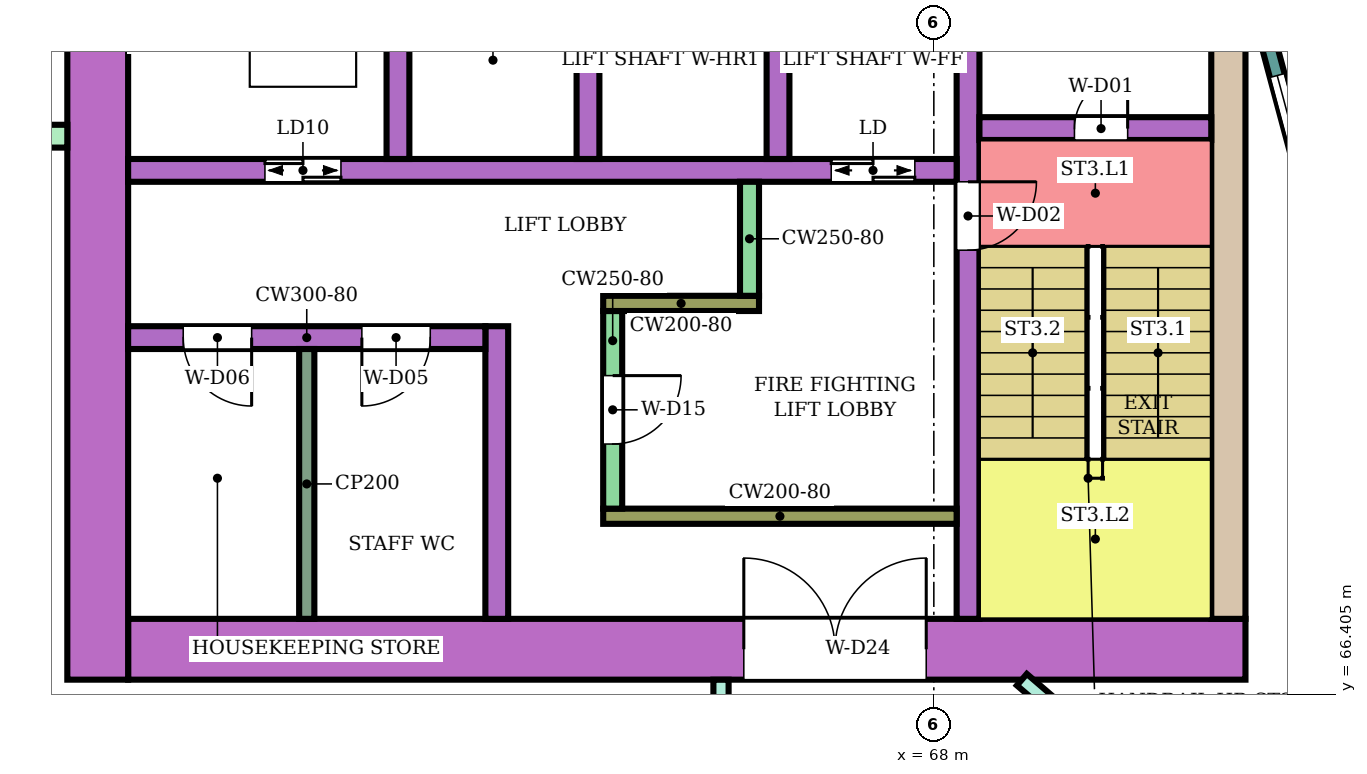
"""IFC4 building model, lengths in metres.
Left out: names, types, materials, properties, quantities, classifications, styles, units other than length and angle.
Written with IfcOpenShell. Run it as: python <this file> out.ifc"""

import sys

from ifc_helpers import new_model, si_unit, direction, frame, frame_2d, origin, place, context, subcontext, project, spatial, rectangle, extrude, element, fill, save


model = new_model("IFC4")
c1 = context("Model", 3, precision=1e-05, world=origin(), true_north=direction((0.0, 1.0)))
c2 = subcontext(c1, "Body", "Model", "MODEL_VIEW")
j1 = project(units=[si_unit("LENGTHUNIT", "METRE"), si_unit("PLANEANGLEUNIT", "RADIAN")], contexts=[c1])
p1 = place(None, origin())
s1 = spatial("IfcSite", under=j1, at=p1, CompositionType="ELEMENT")
p2 = place(p1, origin())
s2 = spatial("IfcBuilding", under=s1, at=p2, CompositionType="ELEMENT")
p3 = place(p2, frame((0.0, 0.0, 44.0)))
s3 = spatial("IfcBuildingStorey", under=s2, at=p3, CompositionType="ELEMENT", Elevation=44.0)
p4 = place(p3, frame((72.1, 67.0, 0.0), z_axis=(0.0, 0.0, 1.0), x_axis=(-1.0, 0.0, 0.0)))
e1 = element("IfcWall", 1, at=p4, inside=s3, PredefinedType="SHEAR", context=c2, shape_type="SweptSolid", body=[
    extrude(rectangle(XDim=14.7, YDim=0.8, at=frame_2d((7.35, 0.0))), origin(), (0.0, 0.0, 1.0), 3.48),
])
p5 = place(p4, frame((4.2, 0.0, 0.0)))
e2 = element("IfcOpeningElement", 2, at=p5, cuts=e1, PredefinedType="OPENING", context=c2, shape_type="SweptSolid", body=[
    extrude(rectangle(XDim=2.4, YDim=2.4, at=frame_2d((1.2, 1.2))), frame((0.0, 0.41, 0.0), z_axis=(0.0, -1.0, 0.0), x_axis=(1.0, 0.0, 0.0)), (0.0, 0.0, 1.0), 0.82),
])
p6 = place(p3, frame((71.875, 75.0, 0.0), z_axis=(0.0, 0.0, 1.0), x_axis=(0.0, -1.0, 0.0)))
e3 = element("IfcWall", 3, at=p6, inside=s3, PredefinedType="SHEAR", context=c2, shape_type="SweptSolid", body=[
    extrude(rectangle(XDim=7.6, YDim=0.45, at=frame_2d((3.8, 0.0))), origin(), (0.0, 0.0, 1.0), 3.48),
])
p7 = place(p3, frame((57.0, 83.4, 0.0), z_axis=(0.0, 0.0, 1.0), x_axis=(0.0, -1.0, 0.0)))
e4 = element("IfcWall", 4, at=p7, inside=s3, PredefinedType="SHEAR", context=c2, shape_type="SweptSolid", body=[
    extrude(rectangle(XDim=16.8, YDim=0.8, at=frame_2d((8.4, 0.0))), origin(), (0.0, 0.0, 1.0), 3.48),
])
p8 = place(p3, frame((68.45, 75.0, 0.0), z_axis=(0.0, 0.0, 1.0), x_axis=(0.0, -1.0, 0.0)))
e5 = element("IfcWall", 5, at=p8, inside=s3, PredefinedType="SHEAR", context=c2, shape_type="SweptSolid", body=[
    extrude(rectangle(XDim=7.6, YDim=0.3, at=frame_2d((3.8, 0.0))), origin(), (0.0, 0.0, 1.0), 3.48),
])
p9 = place(p8, frame((1.85, 0.0, 0.0)))
e6 = element("IfcOpeningElement", 6, at=p9, cuts=e5, PredefinedType="OPENING", context=c2, shape_type="SweptSolid", body=[
    extrude(rectangle(XDim=0.9, YDim=2.1, at=frame_2d((0.45, 1.05))), frame((0.0, 0.16, 0.0), z_axis=(0.0, -1.0, 0.0), x_axis=(1.0, 0.0, 0.0)), (0.0, 0.0, 1.0), 0.32),
])
p10 = place(p3, frame((71.65, 73.85, 0.0), z_axis=(0.0, 0.0, 1.0), x_axis=(-1.0, 0.0, 0.0)))
e7 = element("IfcWall", 7, at=p10, inside=s3, PredefinedType="SHEAR", context=c2, shape_type="SweptSolid", body=[
    extrude(rectangle(XDim=3.05, YDim=0.3, at=frame_2d((1.525, 0.0))), origin(), (0.0, 0.0, 1.0), 3.48),
])
p11 = place(p10, frame((1.1, 0.0, 0.0)))
e8 = element("IfcOpeningElement", 8, at=p11, cuts=e7, PredefinedType="OPENING", context=c2, shape_type="SweptSolid", body=[
    extrude(rectangle(XDim=0.7, YDim=2.0, at=frame_2d((0.35, 1.0))), frame((0.0, 0.16, 0.0), z_axis=(0.0, -1.0, 0.0), x_axis=(1.0, 0.0, 0.0)), (0.0, 0.0, 1.0), 0.32),
])
p12 = place(p3, frame((68.3, 73.3, 0.0), z_axis=(0.0, 0.0, 1.0), x_axis=(-1.0, 0.0, 0.0)))
e9 = element("IfcWall", 9, at=p12, inside=s3, PredefinedType="SHEAR", context=c2, shape_type="SweptSolid", body=[
    extrude(rectangle(XDim=10.9, YDim=0.3, at=frame_2d((5.45, 0.0))), origin(), (0.0, 0.0, 1.0), 3.48),
])
p13 = place(p12, frame((0.55, 0.0, 0.0)))
e10 = element("IfcOpeningElement", 10, at=p13, cuts=e9, PredefinedType="OPENING", context=c2, shape_type="SweptSolid", body=[
    extrude(rectangle(XDim=1.1, YDim=2.1, at=frame_2d((0.55, 1.05))), frame((0.0, 0.16, 0.0), z_axis=(0.0, -1.0, 0.0), x_axis=(1.0, 0.0, 0.0)), (0.0, 0.0, 1.0), 0.32),
])
p14 = place(p12, frame((8.1, 0.0, 0.0)))
e11 = element("IfcOpeningElement", 11, at=p14, cuts=e9, PredefinedType="OPENING", context=c2, shape_type="SweptSolid", body=[
    extrude(rectangle(XDim=1.0, YDim=2.1, at=frame_2d((0.5, 1.05))), frame((0.0, 0.16, 0.0), z_axis=(0.0, -1.0, 0.0), x_axis=(1.0, 0.0, 0.0)), (0.0, 0.0, 1.0), 0.32),
])
for number, where, z_axis, x_axis in (
    (12, (65.95, 76.0, 0.0), (0.0, 0.0, 1.0), (0.0, -1.0, 0.0)),
    (13, (63.45, 76.0, 0.0), (0.0, 0.0, 1.0), (0.0, -1.0, 0.0)),
    (14, (60.95, 76.0, 0.0), (0.0, 0.0, 1.0), (0.0, -1.0, 0.0)),
):
    element("IfcWall", number, at=place(p3, frame(where, z_axis=z_axis, x_axis=x_axis)), inside=s3, PredefinedType="SHEAR", context=c2, shape_type="SweptSolid", body=[
        extrude(rectangle(XDim=2.55, YDim=0.3, at=frame_2d((1.275, 0.0))), origin(), (0.0, 0.0, 1.0), 3.48),
    ])
p15 = place(p3, frame((68.3, 68.75, 0.0), z_axis=(0.0, 0.0, 1.0), x_axis=(-1.0, 0.0, 0.0)))
e15 = element("IfcWall", 15, at=p15, inside=s3, PredefinedType="SHEAR", context=c2, shape_type="SweptSolid", body=[
    extrude(rectangle(XDim=4.65, YDim=0.2, at=frame_2d((2.325, 0.0))), origin(), (0.0, 0.0, 1.0), 3.48),
])
p16 = place(p3, frame((63.775, 71.45, 0.0), z_axis=(0.0, 0.0, 1.0), x_axis=(0.0, -1.0, 0.0)))
e16 = element("IfcWall", 16, at=p16, inside=s3, PredefinedType="SHEAR", context=c2, shape_type="SweptSolid", body=[
    extrude(rectangle(XDim=2.6, YDim=0.25, at=frame_2d((1.3, 0.0))), origin(), (0.0, 0.0, 1.0), 3.48),
])
p17 = place(p16, frame((0.85, 0.0, 0.0)))
e17 = element("IfcOpeningElement", 17, at=p17, cuts=e16, PredefinedType="OPENING", context=c2, shape_type="SweptSolid", body=[
    extrude(rectangle(XDim=0.9, YDim=2.1, at=frame_2d((0.45, 1.05))), frame((0.0, 0.135, 0.0), z_axis=(0.0, -1.0, 0.0), x_axis=(1.0, 0.0, 0.0)), (0.0, 0.0, 1.0), 0.27),
])
p18 = place(p3, frame((65.7, 71.55, 0.0), z_axis=(0.0, 0.0, 1.0), x_axis=(-1.0, 0.0, 0.0)))
e18 = element("IfcWall", 18, at=p18, inside=s3, PredefinedType="SHEAR", context=c2, shape_type="SweptSolid", body=[
    extrude(rectangle(XDim=2.05, YDim=0.2, at=frame_2d((1.025, 0.0))), origin(), (0.0, 0.0, 1.0), 3.48),
])
p19 = place(p3, frame((65.575, 73.15, 0.0), z_axis=(0.0, 0.0, 1.0), x_axis=(0.0, -1.0, 0.0)))
e19 = element("IfcWall", 19, at=p19, inside=s3, PredefinedType="SHEAR", context=c2, shape_type="SweptSolid", body=[
    extrude(rectangle(XDim=1.5, YDim=0.25, at=frame_2d((0.75, 0.0))), origin(), (0.0, 0.0, 1.0), 3.48),
])
p20 = place(p3, frame((62.25, 71.25, 0.0), z_axis=(0.0, 0.0, 1.0), x_axis=(0.0, -1.0, 0.0)))
e20 = element("IfcWall", 20, at=p20, inside=s3, PredefinedType="SHEAR", context=c2, shape_type="SweptSolid", body=[
    extrude(rectangle(XDim=3.85, YDim=0.3, at=frame_2d((1.925, 0.0))), origin(), (0.0, 0.0, 1.0), 3.48),
])
p21 = place(p3, frame((62.1, 71.1, 0.0), z_axis=(0.0, 0.0, 1.0), x_axis=(-1.0, 0.0, 0.0)))
e21 = element("IfcWall", 21, at=p21, inside=s3, PredefinedType="SHEAR", context=c2, shape_type="SweptSolid", body=[
    extrude(rectangle(XDim=4.7, YDim=0.3, at=frame_2d((2.35, 0.0))), origin(), (0.0, 0.0, 1.0), 3.48),
])
p22 = place(p21, frame((0.725, 0.0, 0.0)))
e22 = element("IfcOpeningElement", 22, at=p22, cuts=e21, PredefinedType="OPENING", context=c2, shape_type="SweptSolid", body=[
    extrude(rectangle(XDim=0.9, YDim=2.1, at=frame_2d((0.45, 1.05))), frame((0.0, 0.16, 0.0), z_axis=(0.0, -1.0, 0.0), x_axis=(1.0, 0.0, 0.0)), (0.0, 0.0, 1.0), 0.32),
])
p23 = place(p21, frame((3.075, 0.0, 0.0)))
e23 = element("IfcOpeningElement", 23, at=p23, cuts=e21, PredefinedType="OPENING", context=c2, shape_type="SweptSolid", body=[
    extrude(rectangle(XDim=0.9, YDim=2.1, at=frame_2d((0.45, 1.05))), frame((0.0, 0.16, 0.0), z_axis=(0.0, -1.0, 0.0), x_axis=(1.0, 0.0, 0.0)), (0.0, 0.0, 1.0), 0.32),
])
p24 = place(p3, frame((56.6, 73.75, 0.0), z_axis=(0.0, 0.0, 1.0), x_axis=(-1.0, 0.0, 0.0)))
e24 = element("IfcWall", 24, at=p24, inside=s3, PredefinedType="NOTDEFINED", context=c2, shape_type="SweptSolid", body=[
    extrude(rectangle(XDim=2.416, YDim=0.3, at=frame_2d((1.208, 0.0))), origin(), (0.0, 0.0, 1.0), 3.8),
])
p25 = place(p3, frame((72.396, 75.0, 0.0), z_axis=(0.0, 0.0, 1.0), x_axis=(0.258789828301, -0.965933654434, 0.0)))
e25 = element("IfcWall", 25, at=p25, inside=s3, PredefinedType="NOTDEFINED", context=c2, shape_type="SweptSolid", body=[
    extrude(rectangle(XDim=3.936, YDim=0.2, at=frame_2d((1.968, 0.0))), origin(), (0.0, 0.0, 1.0), 3.8),
])
p26 = place(p25, frame((0.468, 0.0, 0.9)))
e26 = element("IfcOpeningElement", 26, at=p26, cuts=e25, PredefinedType="OPENING", context=c2, shape_type="SweptSolid", body=[
    extrude(rectangle(XDim=3.0, YDim=2.3, at=frame_2d((1.5, 1.15))), frame((0.0, 0.11, 0.0), z_axis=(0.0, -1.0, 0.0), x_axis=(1.0, 0.0, 0.0)), (0.0, 0.0, 1.0), 0.22),
])
p27 = place(p3, frame((65.2, 65.2, 0.0), z_axis=(0.0, 0.0, 1.0), x_axis=(0.0, 1.0, 0.0)))
e27 = element("IfcWall", 27, at=p27, inside=s3, PredefinedType="PARTITIONING", context=c2, shape_type="SweptSolid", body=[
    extrude(rectangle(XDim=1.399, YDim=0.2, at=frame_2d((0.7, 0.0))), origin(), (0.0, 0.0, 1.0), 3.35),
])
p28 = place(p3, frame((69.158, 66.6, 0.0), z_axis=(0.0, 0.0, 1.0), x_axis=(0.758063092745, -0.652181222835, 0.0)))
e28 = element("IfcWall", 28, at=p28, inside=s3, PredefinedType="PARTITIONING", context=c2, shape_type="SweptSolid", body=[
    extrude(rectangle(XDim=5.16, YDim=0.2, at=frame_2d((2.58, 0.0))), origin(), (0.0, 0.0, 1.0), 3.35),
])
p29 = place(p28, frame((2.165, 0.0, 0.0)))
e29 = element("IfcOpeningElement", 29, at=p29, cuts=e28, PredefinedType="OPENING", context=c2, shape_type="SweptSolid", body=[
    extrude(rectangle(XDim=0.9, YDim=2.1, at=frame_2d((0.45, 1.05))), frame((0.0, 0.11, 0.0), z_axis=(0.0, -1.0, 0.0), x_axis=(1.0, 0.0, 0.0)), (0.0, 0.0, 1.0), 0.22),
])
p30 = place(p3, frame((59.75, 70.95, 0.0), z_axis=(0.0, 0.0, 1.0), x_axis=(0.0, -1.0, 0.0)))
e30 = element("IfcWall", 30, at=p30, inside=s3, PredefinedType="PARTITIONING", context=c2, shape_type="SweptSolid", body=[
    extrude(rectangle(XDim=3.55, YDim=0.2, at=frame_2d((1.775, 0.0))), origin(), (0.0, 0.0, 1.0), 3.48),
])
p31 = place(p26, origin())
e31 = element("IfcWindow", 31, at=p31, inside=s3, PartitioningType="SINGLE_PANEL", PredefinedType="WINDOW", context=c2, shape_type="SweptSolid", body=[
    extrude(rectangle(XDim=3.0, YDim=2.3, at=frame_2d((1.5, 1.15))), frame((0.0, 0.03, 0.0), z_axis=(0.0, -1.0, 0.0), x_axis=(1.0, 0.0, 0.0)), (0.0, 0.0, 1.0), 0.06),
])
fill(e26, e31)
p32 = place(p11, frame((0.7, 0.0, 0.0), z_axis=(0.0, 0.0, 1.0), x_axis=(-1.0, 0.0, 0.0)))
e32 = element("IfcDoor", 32, at=p32, inside=s3, OperationType="SINGLE_SWING_RIGHT", PredefinedType="DOOR", context=c2, shape_type="SweptSolid", body=[
    extrude(rectangle(XDim=0.7, YDim=2.0, at=frame_2d((0.35, 1.0))), frame((0.0, 0.025, 0.0), z_axis=(0.0, -1.0, 0.0), x_axis=(1.0, 0.0, 0.0)), (0.0, 0.0, 1.0), 0.05),
])
fill(e8, e32)
p33 = place(p9, origin())
e33 = element("IfcDoor", 33, at=p33, inside=s3, OperationType="SINGLE_SWING_LEFT", PredefinedType="DOOR", context=c2, shape_type="SweptSolid", body=[
    extrude(rectangle(XDim=0.9, YDim=2.1, at=frame_2d((0.45, 1.05))), frame((0.0, 0.025, 0.0), z_axis=(0.0, -1.0, 0.0), x_axis=(1.0, 0.0, 0.0)), (0.0, 0.0, 1.0), 0.05),
])
fill(e6, e33)
p34 = place(p13, origin())
e34 = element("IfcDoor", 34, at=p34, inside=s3, OperationType="DOUBLE_DOOR_SLIDING", PredefinedType="DOOR", context=c2, shape_type="SweptSolid", body=[
    extrude(rectangle(XDim=1.1, YDim=2.1, at=frame_2d((0.55, 1.05))), frame((0.0, 0.025, 0.0), z_axis=(0.0, -1.0, 0.0), x_axis=(1.0, 0.0, 0.0)), (0.0, 0.0, 1.0), 0.05),
])
fill(e10, e34)
p35 = place(p14, origin())
e35 = element("IfcDoor", 35, at=p35, inside=s3, OperationType="DOUBLE_DOOR_SLIDING", PredefinedType="DOOR", context=c2, shape_type="SweptSolid", body=[
    extrude(rectangle(XDim=1.0, YDim=2.1, at=frame_2d((0.5, 1.05))), frame((0.0, 0.025, 0.0), z_axis=(0.0, -1.0, 0.0), x_axis=(1.0, 0.0, 0.0)), (0.0, 0.0, 1.0), 0.05),
])
fill(e11, e35)
p36 = place(p17, origin())
e36 = element("IfcDoor", 36, at=p36, inside=s3, OperationType="SINGLE_SWING_LEFT", PredefinedType="DOOR", context=c2, shape_type="SweptSolid", body=[
    extrude(rectangle(XDim=0.9, YDim=2.1, at=frame_2d((0.45, 1.05))), frame((0.0, 0.025, 0.0), z_axis=(0.0, -1.0, 0.0), x_axis=(1.0, 0.0, 0.0)), (0.0, 0.0, 1.0), 0.05),
])
fill(e17, e36)
p37 = place(p22, origin())
e37 = element("IfcDoor", 37, at=p37, inside=s3, OperationType="SINGLE_SWING_RIGHT", PredefinedType="DOOR", context=c2, shape_type="SweptSolid", body=[
    extrude(rectangle(XDim=0.9, YDim=2.1, at=frame_2d((0.45, 1.05))), frame((0.0, 0.025, 0.0), z_axis=(0.0, -1.0, 0.0), x_axis=(1.0, 0.0, 0.0)), (0.0, 0.0, 1.0), 0.05),
])
fill(e22, e37)
p38 = place(p23, origin())
e38 = element("IfcDoor", 38, at=p38, inside=s3, OperationType="SINGLE_SWING_LEFT", PredefinedType="DOOR", context=c2, shape_type="SweptSolid", body=[
    extrude(rectangle(XDim=0.9, YDim=2.1, at=frame_2d((0.45, 1.05))), frame((0.0, 0.025, 0.0), z_axis=(0.0, -1.0, 0.0), x_axis=(1.0, 0.0, 0.0)), (0.0, 0.0, 1.0), 0.05),
])
fill(e23, e38)
p39 = place(p5, frame((2.4, 0.0, 0.0), z_axis=(0.0, 0.0, 1.0), x_axis=(-1.0, 0.0, 0.0)))
e39 = element("IfcDoor", 39, at=p39, inside=s3, OperationType="DOUBLE_DOOR_SINGLE_SWING", PredefinedType="DOOR", context=c2, shape_type="SweptSolid", body=[
    extrude(rectangle(XDim=2.4, YDim=2.4, at=frame_2d((1.2, 1.2))), frame((0.0, 0.025, 0.0), z_axis=(0.0, -1.0, 0.0), x_axis=(1.0, 0.0, 0.0)), (0.0, 0.0, 1.0), 0.05),
])
fill(e2, e39)
save(model, sys.argv[1])
